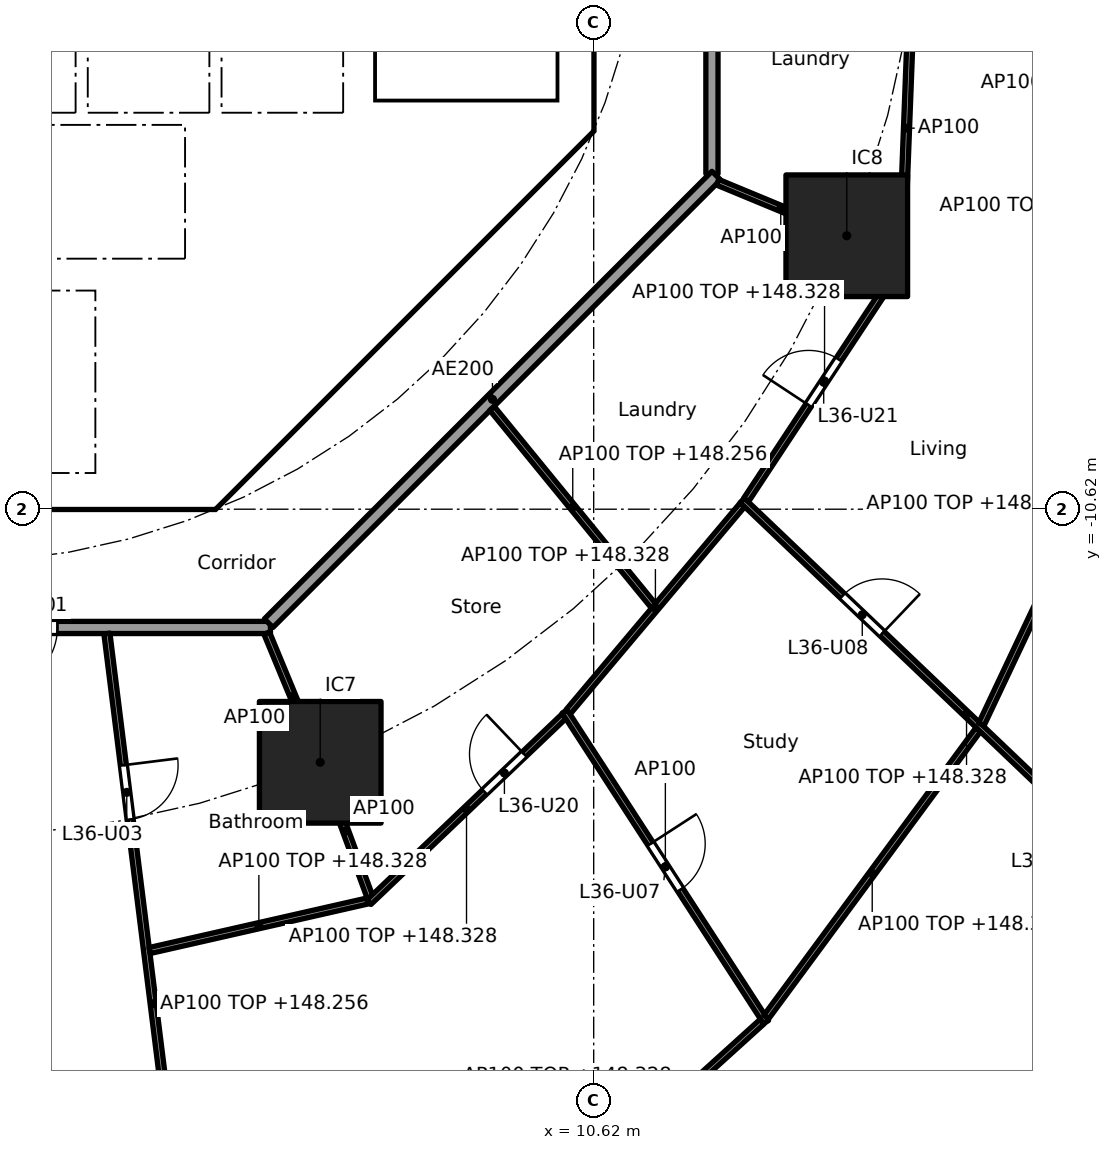
"""IFC4 building model, lengths in metres.
Left out: names, types, materials, properties, quantities, classifications, styles, units other than length and angle.
Written with IfcOpenShell. Run it as: python <this file> out.ifc"""

import sys

from ifc_helpers import new_model, si_unit, direction, frame, frame_2d, origin, origin_2d, place, context, subcontext, project, spatial, polyline, rectangle, outline, extrude, element, fill, save


model = new_model("IFC4")
c1 = context("Model", 3, precision=1e-05, world=origin(), true_north=direction((0.0, 1.0)))
c2 = subcontext(c1, "Body", "Model", "MODEL_VIEW")
j1 = project(units=[si_unit("LENGTHUNIT", "METRE"), si_unit("PLANEANGLEUNIT", "RADIAN")], contexts=[c1])
p1 = place(None, origin())
s1 = spatial("IfcSite", under=j1, at=p1, CompositionType="ELEMENT")
p2 = place(p1, origin())
s2 = spatial("IfcBuilding", under=s1, at=p2, CompositionType="ELEMENT")
p3 = place(p2, frame((0.0, 0.0, 145.5)))
s3 = spatial("IfcBuildingStorey", under=s2, at=p3, CompositionType="ELEMENT", Elevation=145.5)
for number, where, z_axis, x_axis in (
    (1, (6.123, -14.782, 0.0), (0.0, 0.0, 1.0), (1.0, 0.0, 0.0)),
    (2, (14.782, -6.123, 0.0), (0.0, 0.0, 1.0), (1.0, 0.0, 0.0)),
):
    element("IfcColumn", number, at=place(p3, frame(where, z_axis=z_axis, x_axis=x_axis)), inside=s3, PredefinedType="COLUMN", context=c2, shape_type="SweptSolid", body=[
        extrude(rectangle(XDim=2.0, YDim=2.0, at=origin_2d()), origin(), (0.0, 0.0, 1.0), 3.7),
    ])
p4 = place(p3, frame((4.613, -9.988, 0.0), z_axis=(0.0, 0.0, 1.0), x_axis=(0.707106781187, 0.707106781187, 0.0)))
e3 = element("IfcWall", 3, at=p4, inside=s3, PredefinedType="SHEAR", context=c2, shape_type="SweptSolid", body=[
    extrude(rectangle(XDim=7.602, YDim=0.6, at=frame_2d((3.801, 0.0))), origin(), (0.0, 0.0, 1.0), 3.44),
])
p5 = place(p4, frame((3.201, 0.0, 0.0)))
e4 = element("IfcOpeningElement", 4, at=p5, cuts=e3, PredefinedType="OPENING", context=c2, shape_type="SweptSolid", body=[
    extrude(rectangle(XDim=1.2, YDim=2.1, at=frame_2d((0.6, 1.05))), frame((0.0, 0.31, 0.0), z_axis=(0.0, -1.0, 0.0), x_axis=(1.0, 0.0, 0.0)), (0.0, 0.0, 1.0), 0.62),
])
p6 = place(p3, frame((4.0, -10.025, 0.0), z_axis=(0.0, 0.0, 1.0), x_axis=(0.0, 1.0, 0.0)))
e5 = element("IfcWall", 5, at=p6, inside=s3, PredefinedType="SOLIDWALL", context=c2, shape_type="SweptSolid", body=[
    extrude(rectangle(XDim=3.0, YDim=0.2, at=frame_2d((1.5, 0.0))), origin(), (0.0, 0.0, 1.0), 3.44),
])
p7 = place(p6, frame((0.975, 0.0, 0.0)))
e6 = element("IfcOpeningElement", 6, at=p7, cuts=e5, PredefinedType="OPENING", context=c2, shape_type="SweptSolid", body=[
    extrude(rectangle(XDim=1.1, YDim=2.1, at=frame_2d((0.55, 1.05))), frame((0.0, 0.11, 0.0), z_axis=(0.0, -1.0, 0.0), x_axis=(1.0, 0.0, 0.0)), (0.0, 0.0, 1.0), 0.22),
])
p8 = place(p3, frame((4.0, -6.5, 0.0), z_axis=(0.0, 0.0, 1.0), x_axis=(0.0, 1.0, 0.0)))
e7 = element("IfcWall", 7, at=p8, inside=s3, PredefinedType="SOLIDWALL", context=c2, shape_type="SweptSolid", body=[
    extrude(rectangle(XDim=2.2, YDim=0.2, at=frame_2d((1.1, 0.0))), origin(), (0.0, 0.0, 1.0), 3.44),
])
p9 = place(p8, frame((0.55, 0.0, 0.0)))
e8 = element("IfcOpeningElement", 8, at=p9, cuts=e7, PredefinedType="OPENING", context=c2, shape_type="SweptSolid", body=[
    extrude(rectangle(XDim=1.1, YDim=2.1, at=frame_2d((0.55, 1.05))), frame((0.0, 0.11, 0.0), z_axis=(0.0, -1.0, 0.0), x_axis=(1.0, 0.0, 0.0)), (0.0, 0.0, 1.0), 0.22),
])
p10 = place(p3, origin())
e9 = element("IfcWall", 9, at=p10, inside=s3, PredefinedType="SHEAR", context=c2, shape_type="SweptSolid", body=[
    extrude(outline(polyline([(-4.152, -10.025), (4.152, -10.025), (4.401, -9.776), (4.825, -10.2), (4.401, -10.625), (-4.401, -10.625), (-4.825, -10.2), (-4.401, -9.776), (-4.152, -10.025)])), origin(), (0.0, 0.0, 1.0), 3.44),
])
p11 = place(p3, origin())
e10 = element("IfcWall", 10, at=p11, inside=s3, PredefinedType="SHEAR", context=c2, shape_type="SweptSolid", body=[
    extrude(outline(polyline([(9.776, -4.401), (10.025, -4.152), (10.025, -3.801), (10.025, 4.152), (9.776, 4.401), (10.2, 4.825), (10.625, 4.401), (10.625, -4.401), (10.2, -4.825), (9.776, -4.401)])), origin(), (0.0, 0.0, 1.0), 3.44),
])
p12 = place(p3, origin())
e11 = element("IfcWall", 11, at=p12, inside=s3, PredefinedType="SOLIDWALL", context=c2, shape_type="SweptSolid", body=[
    extrude(outline(polyline([(-6.7, -2.1), (-6.5, -2.1), (-6.5, -4.1), (-4.5, -4.1), (-4.5, -2.1), (-4.3, -2.1), (-4.3, -4.1), (-2.3, -4.1), (-2.3, -2.1), (-2.1, -2.1), (-2.1, -4.1), (-0.1, -4.1), (-0.1, -2.1), (0.1, -2.1), (0.1, -4.1), (2.1, -4.1), (2.1, -2.1), (2.3, -2.1), (2.3, -4.1), (4.3, -4.1), (4.3, -2.1), (4.5, -2.1), (4.5, -4.1), (6.5, -4.1), (6.5, -2.1), (6.7, -2.1), (6.7, -4.3), (-6.7, -4.3), (-6.7, -2.1)])), origin(), (0.0, 0.0, 1.0), 3.44),
])
p13 = place(p3, origin())
e12 = element("IfcWall", 12, at=p13, inside=s3, PredefinedType="SOLIDWALL", context=c2, shape_type="SweptSolid", body=[
    extrude(outline(polyline([(4.1, -7.025), (-4.1, -7.025), (-4.1, -6.5), (4.1, -6.5), (4.1, -7.025)])), origin(), (0.0, 0.0, 1.0), 3.44),
])
p14 = place(p3, origin())
e13 = element("IfcWall", 13, at=p14, inside=s3, PredefinedType="SOLIDWALL", context=c2, shape_type="SweptSolid", body=[
    extrude(outline(polyline([(7.025, -3.9), (6.7, -3.9), (6.7, 3.9), (7.025, 3.9), (7.025, -3.9)])), origin(), (0.0, 0.0, 1.0), 3.44),
])
p15 = place(p3, origin())
e14 = element("IfcWall", 14, at=p15, inside=s3, PredefinedType="SOLIDWALL", context=c2, shape_type="SweptSolid", body=[
    extrude(outline(polyline([(10.025, -4.1), (6.7, -4.1), (6.7, -3.9), (10.025, -3.9), (10.025, -4.1)])), origin(), (0.0, 0.0, 1.0), 3.44),
])
p16 = place(p3, frame((12.565, -5.104, 0.0), z_axis=(0.0, 0.0, 1.0), x_axis=(0.0, 1.0, 0.0)))
e15 = element("IfcWall", 15, at=p16, inside=s3, PredefinedType="PARTITIONING", context=c2, shape_type="SweptSolid", body=[
    extrude(rectangle(XDim=10.209, YDim=0.2, at=frame_2d((5.104, 0.0))), origin(), (0.0, 0.0, 1.0), 3.44),
])
p17 = place(p3, frame((-5.104, -12.565, 0.0), z_axis=(0.0, 0.0, 1.0), x_axis=(1.0, 0.0, 0.0)))
e16 = element("IfcWall", 16, at=p17, inside=s3, PredefinedType="PARTITIONING", context=c2, shape_type="SweptSolid", body=[
    extrude(rectangle(XDim=10.409, YDim=0.2, at=frame_2d((5.205, 0.0))), origin(), (0.0, 0.0, 1.0), 3.44),
])
p18 = place(p17, frame((5.906, 0.0, 0.0)))
e17 = element("IfcOpeningElement", 17, at=p18, cuts=e16, PredefinedType="OPENING", context=c2, shape_type="SweptSolid", body=[
    extrude(rectangle(XDim=1.0, YDim=2.1, at=frame_2d((0.5, 1.05))), frame((0.0, 0.11, 0.0), z_axis=(0.0, -1.0, 0.0), x_axis=(1.0, 0.0, 0.0)), (0.0, 0.0, 1.0), 0.22),
])
p19 = place(p3, frame((5.275, -12.494, 0.0), z_axis=(0.0, 0.0, 1.0), x_axis=(0.707106781187, 0.707106781187, 0.0)))
e18 = element("IfcWall", 18, at=p19, inside=s3, PredefinedType="PARTITIONING", context=c2, shape_type="SweptSolid", body=[
    extrude(rectangle(XDim=10.409, YDim=0.2, at=frame_2d((5.205, 0.0))), origin(), (0.0, 0.0, 1.0), 3.44),
])
p20 = place(p3, frame((15.849, -2.158, 0.0), z_axis=(0.0, 0.0, 1.0), x_axis=(-0.038390448414, -0.999262815014, 0.0)))
e19 = element("IfcWall", 19, at=p20, inside=s3, PredefinedType="PARTITIONING", context=c2, shape_type="SweptSolid", body=[
    extrude(rectangle(XDim=4.394, YDim=0.1, at=frame_2d((2.197, 0.0))), origin(), (0.0, 0.0, 1.0), 3.44),
])
p21 = place(p3, frame((2.615, -12.664, 0.0), z_axis=(0.0, 0.0, 1.0), x_axis=(0.124051875784, -0.992275733914, 0.0)))
e20 = element("IfcWall", 20, at=p21, inside=s3, PredefinedType="PARTITIONING", context=c2, shape_type="SweptSolid", body=[
    extrude(rectangle(XDim=12.271, YDim=0.1, at=frame_2d((6.135, 0.0))), origin(), (0.0, 0.0, 1.0), 2.756),
])
p22 = place(p21, frame((2.183, 0.0, 0.0)))
e21 = element("IfcOpeningElement", 21, at=p22, cuts=e20, PredefinedType="OPENING", context=c2, shape_type="SweptSolid", body=[
    extrude(rectangle(XDim=0.9, YDim=2.1, at=frame_2d((0.45, 1.05))), frame((0.0, 0.06, 0.0), z_axis=(0.0, -1.0, 0.0), x_axis=(1.0, 0.0, 0.0)), (0.0, 0.0, 1.0), 0.12),
])
p23 = place(p21, frame((8.293, 0.0, 0.0)))
e22 = element("IfcOpeningElement", 22, at=p23, cuts=e20, PredefinedType="OPENING", context=c2, shape_type="SweptSolid", body=[
    extrude(rectangle(XDim=0.9, YDim=2.1, at=frame_2d((0.45, 1.05))), frame((0.0, 0.06, 0.0), z_axis=(0.0, -1.0, 0.0), x_axis=(1.0, 0.0, 0.0)), (0.0, 0.0, 1.0), 0.12),
])
p24 = place(p3, frame((3.317, -17.878, 0.0), z_axis=(0.0, 0.0, 1.0), x_axis=(0.975099660451, 0.221767112505, 0.0)))
e23 = element("IfcWall", 23, at=p24, inside=s3, PredefinedType="PARTITIONING", context=c2, shape_type="SweptSolid", body=[
    extrude(rectangle(XDim=3.686, YDim=0.1, at=frame_2d((1.843, 0.0))), origin(), (0.0, 0.0, 1.0), 2.828),
])
p25 = place(p3, frame((5.243, -12.657, 0.0), z_axis=(0.0, 0.0, 1.0), x_axis=(0.382703272338, -0.923871314276, 0.0)))
e24 = element("IfcWall", 24, at=p25, inside=s3, PredefinedType="PARTITIONING", context=c2, shape_type="SweptSolid", body=[
    extrude(rectangle(XDim=2.249, YDim=0.1, at=frame_2d((1.125, 0.0))), origin(), (0.0, 0.0, 1.0), 3.44),
])
p26 = place(p3, frame((6.14, -14.829, 0.0), z_axis=(0.0, 0.0, 1.0), x_axis=(0.346198576881, -0.938161257655, 0.0)))
e25 = element("IfcWall", 25, at=p26, inside=s3, PredefinedType="PARTITIONING", context=c2, shape_type="SweptSolid", body=[
    extrude(rectangle(XDim=2.317, YDim=0.1, at=frame_2d((1.158, 0.0))), origin(), (0.0, 0.0, 1.0), 3.44),
])
p27 = place(p3, frame((6.923, -17.084, 0.0), z_axis=(0.0, 0.0, 1.0), x_axis=(0.723719008606, 0.690094773623, 0.0)))
e26 = element("IfcWall", 26, at=p27, inside=s3, PredefinedType="PARTITIONING", context=c2, shape_type="SweptSolid", body=[
    extrude(rectangle(XDim=4.436, YDim=0.1, at=frame_2d((2.218, 0.0))), origin(), (0.0, 0.0, 1.0), 2.828),
])
p28 = place(p27, frame((2.629, 0.0, 0.0)))
e27 = element("IfcOpeningElement", 27, at=p28, cuts=e26, PredefinedType="OPENING", context=c2, shape_type="SweptSolid", body=[
    extrude(rectangle(XDim=0.9, YDim=2.1, at=frame_2d((0.45, 1.05))), frame((0.0, 0.06, 0.0), z_axis=(0.0, -1.0, 0.0), x_axis=(1.0, 0.0, 0.0)), (0.0, 0.0, 1.0), 0.12),
])
p29 = place(p3, frame((9.084, -22.941, 0.0), z_axis=(0.0, 0.0, 1.0), x_axis=(0.741684187175, 0.670749257543, 0.0)))
e28 = element("IfcWall", 28, at=p29, inside=s3, PredefinedType="PARTITIONING", context=c2, shape_type="SweptSolid", body=[
    extrude(rectangle(XDim=5.806, YDim=0.1, at=frame_2d((2.903, 0.0))), origin(), (0.0, 0.0, 1.0), 2.828),
])
p30 = place(p3, frame((10.143, -13.946, 0.0), z_axis=(0.0, 0.0, 1.0), x_axis=(0.543872968754, -0.839167560061, 0.0)))
e29 = element("IfcWall", 29, at=p30, inside=s3, PredefinedType="PARTITIONING", context=c2, shape_type="SweptSolid", body=[
    extrude(rectangle(XDim=6.088, YDim=0.1, at=frame_2d((3.044, 0.0))), origin(), (0.0, 0.0, 1.0), 3.44),
])
p31 = place(p30, frame((2.594, 0.0, 0.0)))
e30 = element("IfcOpeningElement", 30, at=p31, cuts=e29, PredefinedType="OPENING", context=c2, shape_type="SweptSolid", body=[
    extrude(rectangle(XDim=0.9, YDim=2.1, at=frame_2d((0.45, 1.05))), frame((0.0, 0.06, 0.0), z_axis=(0.0, -1.0, 0.0), x_axis=(1.0, 0.0, 0.0)), (0.0, 0.0, 1.0), 0.12),
])
p32 = place(p3, frame((10.202, -13.95, 0.0), z_axis=(0.0, 0.0, 1.0), x_axis=(0.644068144287, 0.764968120587, 0.0)))
e31 = element("IfcWall", 31, at=p32, inside=s3, PredefinedType="PARTITIONING", context=c2, shape_type="SweptSolid", body=[
    extrude(rectangle(XDim=4.449, YDim=0.1, at=frame_2d((2.224, 0.0))), origin(), (0.0, 0.0, 1.0), 2.828),
])
p33 = place(p3, frame((13.457, -18.973, 0.0), z_axis=(0.0, 0.0, 1.0), x_axis=(0.593532053206, 0.80481035146, 0.0)))
e32 = element("IfcWall", 32, at=p33, inside=s3, PredefinedType="PARTITIONING", context=c2, shape_type="SweptSolid", body=[
    extrude(rectangle(XDim=5.876, YDim=0.1, at=frame_2d((2.938, 0.0))), origin(), (0.0, 0.0, 1.0), 2.828),
])
p34 = place(p3, frame((8.948, -8.962, 0.0), z_axis=(0.0, 0.0, 1.0), x_axis=(0.633041272858, -0.774118044524, 0.0)))
e33 = element("IfcWall", 33, at=p34, inside=s3, PredefinedType="PARTITIONING", context=c2, shape_type="SweptSolid", body=[
    extrude(rectangle(XDim=4.195, YDim=0.1, at=frame_2d((2.097, 0.0))), origin(), (0.0, 0.0, 1.0), 2.756),
])
p35 = place(p3, frame((13.064, -10.474, 0.0), z_axis=(0.0, 0.0, 1.0), x_axis=(0.723627371706, -0.690190862673, 0.0)))
e34 = element("IfcWall", 34, at=p35, inside=s3, PredefinedType="PARTITIONING", context=c2, shape_type="SweptSolid", body=[
    extrude(rectangle(XDim=10.193, YDim=0.1, at=frame_2d((5.097, 0.0))), origin(), (0.0, 0.0, 1.0), 2.828),
])
p36 = place(p35, frame((2.277, 0.0, 0.0)))
e35 = element("IfcOpeningElement", 35, at=p36, cuts=e34, PredefinedType="OPENING", context=c2, shape_type="SweptSolid", body=[
    extrude(rectangle(XDim=0.9, YDim=2.1, at=frame_2d((0.45, 1.05))), frame((0.0, 0.06, 0.0), z_axis=(0.0, -1.0, 0.0), x_axis=(1.0, 0.0, 0.0)), (0.0, 0.0, 1.0), 0.12),
])
p37 = place(p35, frame((7.348, 0.0, 0.0)))
e36 = element("IfcOpeningElement", 36, at=p37, cuts=e34, PredefinedType="OPENING", context=c2, shape_type="SweptSolid", body=[
    extrude(rectangle(XDim=0.9, YDim=2.1, at=frame_2d((0.45, 1.05))), frame((0.0, 0.06, 0.0), z_axis=(0.0, -1.0, 0.0), x_axis=(1.0, 0.0, 0.0)), (0.0, 0.0, 1.0), 0.12),
])
p38 = place(p3, frame((13.127, -10.467, 0.0), z_axis=(0.0, 0.0, 1.0), x_axis=(0.550614843759, 0.834759422727, 0.0)))
e37 = element("IfcWall", 37, at=p38, inside=s3, PredefinedType="PARTITIONING", context=c2, shape_type="SweptSolid", body=[
    extrude(rectangle(XDim=4.683, YDim=0.1, at=frame_2d((2.341, 0.0))), origin(), (0.0, 0.0, 1.0), 2.828),
])
p39 = place(p38, frame((1.866, 0.0, 0.0)))
e38 = element("IfcOpeningElement", 38, at=p39, cuts=e37, PredefinedType="OPENING", context=c2, shape_type="SweptSolid", body=[
    extrude(rectangle(XDim=0.9, YDim=2.1, at=frame_2d((0.45, 1.05))), frame((0.0, 0.06, 0.0), z_axis=(0.0, -1.0, 0.0), x_axis=(1.0, 0.0, 0.0)), (0.0, 0.0, 1.0), 0.12),
])
p40 = place(p3, frame((16.995, -14.158, 0.0), z_axis=(0.0, 0.0, 1.0), x_axis=(0.427456178439, 0.904036069808, 0.0)))
e39 = element("IfcWall", 39, at=p40, inside=s3, PredefinedType="PARTITIONING", context=c2, shape_type="SweptSolid", body=[
    extrude(rectangle(XDim=6.113, YDim=0.1, at=frame_2d((3.057, 0.0))), origin(), (0.0, 0.0, 1.0), 2.828),
])
p41 = place(p3, frame((12.657, -5.243, 0.0), z_axis=(0.0, 0.0, 1.0), x_axis=(0.923864733477, -0.382719158442, 0.0)))
e40 = element("IfcWall", 40, at=p41, inside=s3, PredefinedType="PARTITIONING", context=c2, shape_type="SweptSolid", body=[
    extrude(rectangle(XDim=2.25, YDim=0.1, at=frame_2d((1.125, 0.0))), origin(), (0.0, 0.0, 1.0), 3.44),
])
p42 = place(p9, origin())
e41 = element("IfcDoor", 41, at=p42, inside=s3, OperationType="DOUBLE_DOOR_SLIDING", PredefinedType="DOOR", context=c2, shape_type="SweptSolid", body=[
    extrude(rectangle(XDim=1.1, YDim=2.1, at=frame_2d((0.55, 1.05))), frame((0.0, 0.025, 0.0), z_axis=(0.0, -1.0, 0.0), x_axis=(1.0, 0.0, 0.0)), (0.0, 0.0, 1.0), 0.05),
])
fill(e8, e41)
p43 = place(p7, origin())
e42 = element("IfcDoor", 42, at=p43, inside=s3, OperationType="SINGLE_SWING_RIGHT", PredefinedType="DOOR", context=c2, shape_type="SweptSolid", body=[
    extrude(rectangle(XDim=1.1, YDim=2.1, at=frame_2d((0.55, 1.05))), frame((0.0, 0.025, 0.0), z_axis=(0.0, -1.0, 0.0), x_axis=(1.0, 0.0, 0.0)), (0.0, 0.0, 1.0), 0.05),
])
fill(e6, e42)
p44 = place(p5, origin())
e43 = element("IfcDoor", 43, at=p44, inside=s3, OperationType="SINGLE_SWING_LEFT", PredefinedType="DOOR", context=c2, shape_type="SweptSolid", body=[
    extrude(rectangle(XDim=1.2, YDim=2.1, at=frame_2d((0.6, 1.05))), frame((0.0, 0.025, 0.0), z_axis=(0.0, -1.0, 0.0), x_axis=(1.0, 0.0, 0.0)), (0.0, 0.0, 1.0), 0.05),
])
fill(e4, e43)
p45 = place(p18, frame((1.0, 0.0, 0.0), x_axis=(-1.0, 0.0, 0.0)))
e44 = element("IfcDoor", 44, at=p45, inside=s3, OperationType="SINGLE_SWING_RIGHT", PredefinedType="DOOR", context=c2, shape_type="SweptSolid", body=[
    extrude(rectangle(XDim=1.0, YDim=2.1, at=frame_2d((0.5, 1.05))), frame((0.0, 0.025, 0.0), z_axis=(0.0, -1.0, 0.0), x_axis=(1.0, 0.0, 0.0)), (0.0, 0.0, 1.0), 0.05),
])
fill(e17, e44)
p46 = place(p22, origin())
e45 = element("IfcDoor", 45, at=p46, inside=s3, OperationType="SINGLE_SWING_LEFT", PredefinedType="DOOR", context=c2, shape_type="SweptSolid", body=[
    extrude(rectangle(XDim=0.9, YDim=2.1, at=frame_2d((0.45, 1.05))), frame((0.0, 0.025, 0.0), z_axis=(0.0, -1.0, 0.0), x_axis=(1.0, 0.0, 0.0)), (0.0, 0.0, 1.0), 0.05),
])
fill(e21, e45)
p47 = place(p31, origin())
e46 = element("IfcDoor", 46, at=p47, inside=s3, OperationType="SINGLE_SWING_LEFT", PredefinedType="DOOR", context=c2, shape_type="SweptSolid", body=[
    extrude(rectangle(XDim=0.9, YDim=2.1, at=frame_2d((0.45, 1.05))), frame((0.0, 0.025, 0.0), z_axis=(0.0, -1.0, 0.0), x_axis=(1.0, 0.0, 0.0)), (0.0, 0.0, 1.0), 0.05),
])
fill(e30, e46)
p48 = place(p36, origin())
e47 = element("IfcDoor", 47, at=p48, inside=s3, OperationType="SINGLE_SWING_RIGHT", PredefinedType="DOOR", context=c2, shape_type="SweptSolid", body=[
    extrude(rectangle(XDim=0.9, YDim=2.1, at=frame_2d((0.45, 1.05))), frame((0.0, 0.025, 0.0), z_axis=(0.0, -1.0, 0.0), x_axis=(1.0, 0.0, 0.0)), (0.0, 0.0, 1.0), 0.05),
])
fill(e35, e47)
p49 = place(p28, origin())
e48 = element("IfcDoor", 48, at=p49, inside=s3, OperationType="SINGLE_SWING_RIGHT", PredefinedType="DOOR", context=c2, shape_type="SweptSolid", body=[
    extrude(rectangle(XDim=0.9, YDim=2.1, at=frame_2d((0.45, 1.05))), frame((0.0, 0.025, 0.0), z_axis=(0.0, -1.0, 0.0), x_axis=(1.0, 0.0, 0.0)), (0.0, 0.0, 1.0), 0.05),
])
fill(e27, e48)
p50 = place(p39, origin())
e49 = element("IfcDoor", 49, at=p50, inside=s3, OperationType="SINGLE_SWING_LEFT", PredefinedType="DOOR", context=c2, shape_type="SweptSolid", body=[
    extrude(rectangle(XDim=0.9, YDim=2.1, at=frame_2d((0.45, 1.05))), frame((0.0, 0.025, 0.0), z_axis=(0.0, -1.0, 0.0), x_axis=(1.0, 0.0, 0.0)), (0.0, 0.0, 1.0), 0.05),
])
fill(e38, e49)
save(model, sys.argv[1])
